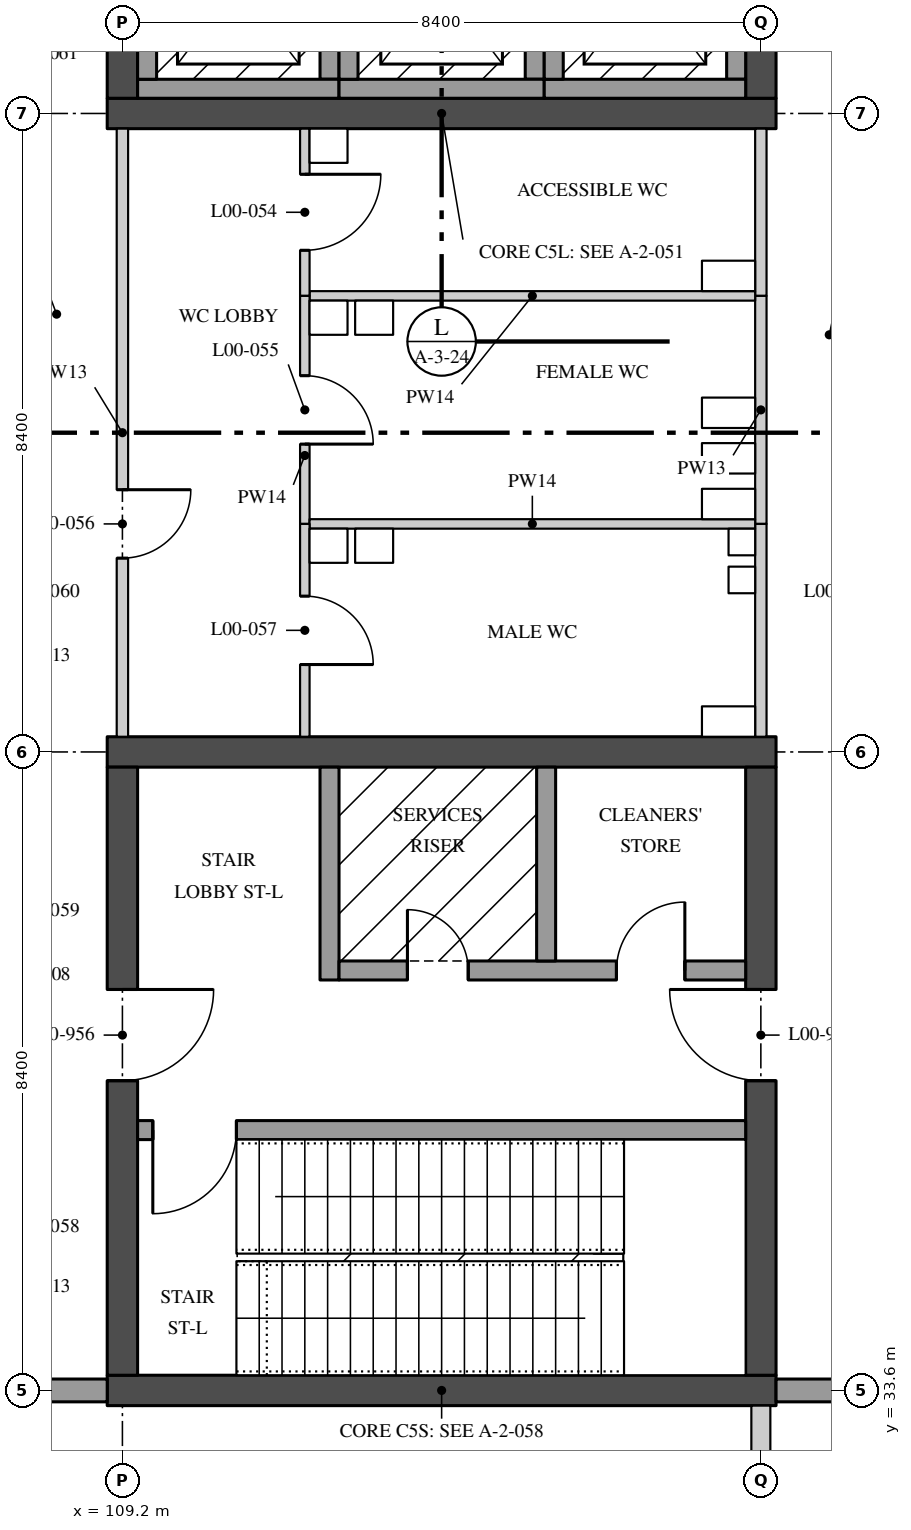
"""IFC4 building model, lengths in metres.
Left out: names, types, materials, properties, quantities, classifications, styles, units other than length and angle.
Written with IfcOpenShell. Run it as: python <this file> out.ifc"""

import sys

from ifc_helpers import new_model, si_unit, direction, frame, frame_2d, origin, place, context, subcontext, project, spatial, rectangle, extrude, element, fill, save


model = new_model("IFC4")
c1 = context("Model", 3, precision=1e-05, world=origin(), true_north=direction((0.0, 1.0)))
c2 = subcontext(c1, "Body", "Model", "MODEL_VIEW")
j1 = project(units=[si_unit("LENGTHUNIT", "METRE"), si_unit("PLANEANGLEUNIT", "RADIAN")], contexts=[c1])
p1 = place(None, origin())
s1 = spatial("IfcSite", under=j1, at=p1, CompositionType="ELEMENT")
p2 = place(p1, origin())
s2 = spatial("IfcBuilding", under=s1, at=p2, CompositionType="ELEMENT")
p3 = place(p2, origin())
s3 = spatial("IfcBuildingStorey", under=s2, at=p3, CompositionType="ELEMENT", Elevation=0.0)
p4 = place(p3, frame((109.0, 50.4, 0.0), z_axis=(0.0, 0.0, 1.0), x_axis=(1.0, 0.0, 0.0)))
e1 = element("IfcWall", 1, at=p4, inside=s3, PredefinedType="SHEAR", context=c2, shape_type="SweptSolid", body=[
    extrude(rectangle(XDim=8.8, YDim=0.4, at=frame_2d((4.4, 0.0))), origin(), (0.0, 0.0, 1.0), 5.05),
])
p5 = place(p3, frame((109.2, 50.6, 0.0), z_axis=(0.0, 0.0, 1.0), x_axis=(0.0, 1.0, 0.0)))
e2 = element("IfcWall", 2, at=p5, inside=s3, PredefinedType="SHEAR", context=c2, shape_type="SweptSolid", body=[
    extrude(rectangle(XDim=8.0, YDim=0.4, at=frame_2d((4.0, 0.0))), origin(), (0.0, 0.0, 1.0), 5.05),
])
p6 = place(p5, frame((3.25, 0.0, 0.0)))
e3 = element("IfcOpeningElement", 3, at=p6, cuts=e2, PredefinedType="OPENING", context=c2, shape_type="SweptSolid", body=[
    extrude(rectangle(XDim=1.2, YDim=2.1, at=frame_2d((0.6, 1.05))), frame((0.0, 0.21, 0.0), z_axis=(0.0, -1.0, 0.0), x_axis=(1.0, 0.0, 0.0)), (0.0, 0.0, 1.0), 0.42),
])
p7 = place(p3, frame((117.6, 50.6, 0.0), z_axis=(0.0, 0.0, 1.0), x_axis=(0.0, 1.0, 0.0)))
e4 = element("IfcWall", 4, at=p7, inside=s3, PredefinedType="SHEAR", context=c2, shape_type="SweptSolid", body=[
    extrude(rectangle(XDim=8.0, YDim=0.4, at=frame_2d((4.0, 0.0))), origin(), (0.0, 0.0, 1.0), 5.05),
])
p8 = place(p7, frame((3.25, 0.0, 0.0)))
e5 = element("IfcOpeningElement", 5, at=p8, cuts=e4, PredefinedType="OPENING", context=c2, shape_type="SweptSolid", body=[
    extrude(rectangle(XDim=1.2, YDim=2.1, at=frame_2d((0.6, 1.05))), frame((0.0, 0.21, 0.0), z_axis=(0.0, -1.0, 0.0), x_axis=(1.0, 0.0, 0.0)), (0.0, 0.0, 1.0), 0.42),
])
p9 = place(p7, frame((6.0, 0.0, 0.0)))
e6 = element("IfcOpeningElement", 6, at=p9, cuts=e4, PredefinedType="OPENING", context=c2, shape_type="SweptSolid", body=[
    extrude(rectangle(XDim=1.2, YDim=2.1, at=frame_2d((0.6, 1.05))), frame((0.0, 0.21, 0.0), z_axis=(0.0, -1.0, 0.0), x_axis=(1.0, 0.0, 0.0)), (0.0, 0.0, 1.0), 0.42),
])
for number, where, z_axis, x_axis in (
    (7, (109.0, 33.6, 0.0), (0.0, 0.0, 1.0), (1.0, 0.0, 0.0)),
    (8, (109.0, 42.0, 0.0), (0.0, 0.0, 1.0), (1.0, 0.0, 0.0)),
):
    element("IfcWall", number, at=place(p3, frame(where, z_axis=z_axis, x_axis=x_axis)), inside=s3, PredefinedType="SHEAR", context=c2, shape_type="SweptSolid", body=[
        extrude(rectangle(XDim=8.8, YDim=0.4, at=frame_2d((4.4, 0.0))), origin(), (0.0, 0.0, 1.0), 5.05),
    ])
p10 = place(p3, frame((109.2, 33.8, 0.0), z_axis=(0.0, 0.0, 1.0), x_axis=(0.0, 1.0, 0.0)))
e9 = element("IfcWall", 9, at=p10, inside=s3, PredefinedType="SHEAR", context=c2, shape_type="SweptSolid", body=[
    extrude(rectangle(XDim=8.0, YDim=0.4, at=frame_2d((4.0, 0.0))), origin(), (0.0, 0.0, 1.0), 5.05),
])
p11 = place(p10, frame((3.875, 0.0, 0.0)))
e10 = element("IfcOpeningElement", 10, at=p11, cuts=e9, PredefinedType="OPENING", context=c2, shape_type="SweptSolid", body=[
    extrude(rectangle(XDim=1.2, YDim=2.1, at=frame_2d((0.6, 1.05))), frame((0.0, 0.21, 0.0), z_axis=(0.0, -1.0, 0.0), x_axis=(1.0, 0.0, 0.0)), (0.0, 0.0, 1.0), 0.42),
])
p12 = place(p3, frame((117.6, 33.8, 0.0), z_axis=(0.0, 0.0, 1.0), x_axis=(0.0, 1.0, 0.0)))
e11 = element("IfcWall", 11, at=p12, inside=s3, PredefinedType="SHEAR", context=c2, shape_type="SweptSolid", body=[
    extrude(rectangle(XDim=8.0, YDim=0.4, at=frame_2d((4.0, 0.0))), origin(), (0.0, 0.0, 1.0), 5.05),
])
p13 = place(p12, frame((3.875, 0.0, 0.0)))
e12 = element("IfcOpeningElement", 12, at=p13, cuts=e11, PredefinedType="OPENING", context=c2, shape_type="SweptSolid", body=[
    extrude(rectangle(XDim=1.2, YDim=2.1, at=frame_2d((0.6, 1.05))), frame((0.0, 0.21, 0.0), z_axis=(0.0, -1.0, 0.0), x_axis=(1.0, 0.0, 0.0)), (0.0, 0.0, 1.0), 0.42),
])
p14 = place(p3, frame((109.4, 37.025, 0.0), z_axis=(0.0, 0.0, 1.0), x_axis=(1.0, 0.0, 0.0)))
e13 = element("IfcWall", 13, at=p14, inside=s3, PredefinedType="SOLIDWALL", context=c2, shape_type="SweptSolid", body=[
    extrude(rectangle(XDim=8.0, YDim=0.25, at=frame_2d((4.0, 0.0))), origin(), (0.0, 0.0, 1.0), 5.05),
])
p15 = place(p14, frame((0.2, 0.0, 0.0)))
e14 = element("IfcOpeningElement", 14, at=p15, cuts=e13, PredefinedType="OPENING", context=c2, shape_type="SweptSolid", body=[
    extrude(rectangle(XDim=1.1, YDim=2.1, at=frame_2d((0.55, 1.05))), frame((0.0, 0.135, 0.0), z_axis=(0.0, -1.0, 0.0), x_axis=(1.0, 0.0, 0.0)), (0.0, 0.0, 1.0), 0.27),
])
p16 = place(p3, frame((111.925, 39.0, 0.0), z_axis=(0.0, 0.0, 1.0), x_axis=(0.0, 1.0, 0.0)))
e15 = element("IfcWall", 15, at=p16, inside=s3, PredefinedType="SOLIDWALL", context=c2, shape_type="SweptSolid", body=[
    extrude(rectangle(XDim=2.8, YDim=0.25, at=frame_2d((1.4, 0.0))), origin(), (0.0, 0.0, 1.0), 5.05),
])
p17 = place(p3, frame((112.05, 39.125, 0.0), z_axis=(0.0, 0.0, 1.0), x_axis=(1.0, 0.0, 0.0)))
e16 = element("IfcWall", 16, at=p17, inside=s3, PredefinedType="SOLIDWALL", context=c2, shape_type="SweptSolid", body=[
    extrude(rectangle(XDim=5.35, YDim=0.25, at=frame_2d((2.675, 0.0))), origin(), (0.0, 0.0, 1.0), 5.05),
])
p18 = place(p17, frame((3.65, 0.0, 0.0)))
e17 = element("IfcOpeningElement", 17, at=p18, cuts=e16, PredefinedType="OPENING", context=c2, shape_type="SweptSolid", body=[
    extrude(rectangle(XDim=0.9, YDim=2.1, at=frame_2d((0.45, 1.05))), frame((0.0, 0.135, 0.0), z_axis=(0.0, -1.0, 0.0), x_axis=(1.0, 0.0, 0.0)), (0.0, 0.0, 1.0), 0.27),
])
p19 = place(p17, frame((0.9, 0.0, 0.0)))
e18 = element("IfcOpeningElement", 18, at=p19, cuts=e16, PredefinedType="OPENING", context=c2, shape_type="SweptSolid", body=[
    extrude(rectangle(XDim=0.8, YDim=2.1, at=frame_2d((0.4, 1.05))), frame((0.0, 0.135, 0.0), z_axis=(0.0, -1.0, 0.0), x_axis=(1.0, 0.0, 0.0)), (0.0, 0.0, 1.0), 0.27),
])
p20 = place(p3, frame((114.775, 39.25, 0.0), z_axis=(0.0, 0.0, 1.0), x_axis=(0.0, 1.0, 0.0)))
e19 = element("IfcWall", 19, at=p20, inside=s3, PredefinedType="SOLIDWALL", context=c2, shape_type="SweptSolid", body=[
    extrude(rectangle(XDim=2.55, YDim=0.25, at=frame_2d((1.275, 0.0))), origin(), (0.0, 0.0, 1.0), 5.05),
])
p21 = place(p3, frame((111.925, 50.85, 0.0), z_axis=(0.0, 0.0, 1.0), x_axis=(0.0, 1.0, 0.0)))
e20 = element("IfcWall", 20, at=p21, inside=s3, PredefinedType="SOLIDWALL", context=c2, shape_type="SweptSolid", body=[
    extrude(rectangle(XDim=2.3, YDim=0.25, at=frame_2d((1.15, 0.0))), origin(), (0.0, 0.0, 1.0), 5.05),
])
p22 = place(p3, frame((109.4, 50.725, 0.0), z_axis=(0.0, 0.0, 1.0), x_axis=(1.0, 0.0, 0.0)))
e21 = element("IfcWall", 21, at=p22, inside=s3, PredefinedType="SOLIDWALL", context=c2, shape_type="SweptSolid", body=[
    extrude(rectangle(XDim=2.65, YDim=0.25, at=frame_2d((1.325, 0.0))), origin(), (0.0, 0.0, 1.0), 5.05),
])
for number, where, z_axis, x_axis in (
    (22, (109.525, 50.85, 0.0), (0.0, 0.0, 1.0), (0.0, 1.0, 0.0)),
    (23, (114.625, 50.85, 0.0), (0.0, 0.0, 1.0), (0.0, 1.0, 0.0)),
):
    element("IfcWall", number, at=place(p3, frame(where, z_axis=z_axis, x_axis=x_axis)), inside=s3, PredefinedType="SOLIDWALL", context=c2, shape_type="SweptSolid", body=[
        extrude(rectangle(XDim=2.3, YDim=0.25, at=frame_2d((1.15, 0.0))), origin(), (0.0, 0.0, 1.0), 5.05),
    ])
p23 = place(p3, frame((112.05, 50.725, 0.0), z_axis=(0.0, 0.0, 1.0), x_axis=(1.0, 0.0, 0.0)))
e24 = element("IfcWall", 24, at=p23, inside=s3, PredefinedType="SOLIDWALL", context=c2, shape_type="SweptSolid", body=[
    extrude(rectangle(XDim=2.7, YDim=0.25, at=frame_2d((1.35, 0.0))), origin(), (0.0, 0.0, 1.0), 5.05),
])
for number, where, z_axis, x_axis in (
    (25, (112.175, 50.85, 0.0), (0.0, 0.0, 1.0), (0.0, 1.0, 0.0)),
    (26, (117.275, 50.85, 0.0), (0.0, 0.0, 1.0), (0.0, 1.0, 0.0)),
):
    element("IfcWall", number, at=place(p3, frame(where, z_axis=z_axis, x_axis=x_axis)), inside=s3, PredefinedType="SOLIDWALL", context=c2, shape_type="SweptSolid", body=[
        extrude(rectangle(XDim=2.3, YDim=0.25, at=frame_2d((1.15, 0.0))), origin(), (0.0, 0.0, 1.0), 5.05),
    ])
p24 = place(p3, frame((114.75, 50.725, 0.0), z_axis=(0.0, 0.0, 1.0), x_axis=(1.0, 0.0, 0.0)))
e27 = element("IfcWall", 27, at=p24, inside=s3, PredefinedType="SOLIDWALL", context=c2, shape_type="SweptSolid", body=[
    extrude(rectangle(XDim=2.65, YDim=0.25, at=frame_2d((1.325, 0.0))), origin(), (0.0, 0.0, 1.0), 5.05),
])
p25 = place(p3, frame((114.875, 50.85, 0.0), z_axis=(0.0, 0.0, 1.0), x_axis=(0.0, 1.0, 0.0)))
e28 = element("IfcWall", 28, at=p25, inside=s3, PredefinedType="SOLIDWALL", context=c2, shape_type="SweptSolid", body=[
    extrude(rectangle(XDim=2.3, YDim=0.25, at=frame_2d((1.15, 0.0))), origin(), (0.0, 0.0, 1.0), 5.05),
])
p26 = place(p3, frame((117.6, 25.65, 0.0), z_axis=(0.0, 0.0, 1.0), x_axis=(0.0, 1.0, 0.0)))
e29 = element("IfcWall", 29, at=p26, inside=s3, PredefinedType="PARTITIONING", context=c2, shape_type="SweptSolid", body=[
    extrude(rectangle(XDim=7.75, YDim=0.25, at=frame_2d((3.875, 0.0))), origin(), (0.0, 0.0, 1.0), 8.375),
])
p27 = place(p3, frame((117.6, 48.0, 0.0), z_axis=(0.0, 0.0, 1.0), x_axis=(0.0, 1.0, 0.0)))
e30 = element("IfcWall", 30, at=p27, inside=s3, PredefinedType="PARTITIONING", context=c2, shape_type="SweptSolid", body=[
    extrude(rectangle(XDim=2.2, YDim=0.15, at=frame_2d((1.1, 0.0))), origin(), (0.0, 0.0, 1.0), 5.05),
])
p28 = place(p3, frame((117.6, 45.0, 0.0), z_axis=(0.0, 0.0, 1.0), x_axis=(0.0, 1.0, 0.0)))
e31 = element("IfcWall", 31, at=p28, inside=s3, PredefinedType="PARTITIONING", context=c2, shape_type="SweptSolid", body=[
    extrude(rectangle(XDim=3.0, YDim=0.15, at=frame_2d((1.5, 0.0))), origin(), (0.0, 0.0, 1.0), 5.05),
])
p29 = place(p3, frame((117.6, 42.2, 0.0), z_axis=(0.0, 0.0, 1.0), x_axis=(0.0, 1.0, 0.0)))
e32 = element("IfcWall", 32, at=p29, inside=s3, PredefinedType="PARTITIONING", context=c2, shape_type="SweptSolid", body=[
    extrude(rectangle(XDim=2.8, YDim=0.15, at=frame_2d((1.4, 0.0))), origin(), (0.0, 0.0, 1.0), 5.05),
])
p30 = place(p3, frame((109.2, 42.2, 0.0), z_axis=(0.0, 0.0, 1.0), x_axis=(0.0, 1.0, 0.0)))
e33 = element("IfcWall", 33, at=p30, inside=s3, PredefinedType="PARTITIONING", context=c2, shape_type="SweptSolid", body=[
    extrude(rectangle(XDim=8.0, YDim=0.15, at=frame_2d((4.0, 0.0))), origin(), (0.0, 0.0, 1.0), 5.05),
])
p31 = place(p30, frame((2.35, 0.0, 0.0)))
e34 = element("IfcOpeningElement", 34, at=p31, cuts=e33, PredefinedType="OPENING", context=c2, shape_type="SweptSolid", body=[
    extrude(rectangle(XDim=0.9, YDim=2.1, at=frame_2d((0.45, 1.05))), frame((0.0, 0.085, 0.0), z_axis=(0.0, -1.0, 0.0), x_axis=(1.0, 0.0, 0.0)), (0.0, 0.0, 1.0), 0.17),
])
p32 = place(p3, frame((111.662, 48.0, 0.0), z_axis=(0.0, 0.0, 1.0), x_axis=(1.0, 0.0, 0.0)))
e35 = element("IfcWall", 35, at=p32, inside=s3, PredefinedType="PARTITIONING", context=c2, shape_type="SweptSolid", body=[
    extrude(rectangle(XDim=5.863, YDim=0.125, at=frame_2d((2.931, 0.0))), origin(), (0.0, 0.0, 1.0), 5.05),
])
p33 = place(p3, frame((111.6, 48.0, 0.0), z_axis=(0.0, 0.0, 1.0), x_axis=(0.0, 1.0, 0.0)))
e36 = element("IfcWall", 36, at=p33, inside=s3, PredefinedType="PARTITIONING", context=c2, shape_type="SweptSolid", body=[
    extrude(rectangle(XDim=2.2, YDim=0.125, at=frame_2d((1.1, 0.0))), origin(), (0.0, 0.0, 1.0), 5.05),
])
p34 = place(p33, frame((0.6, 0.0, 0.0)))
e37 = element("IfcOpeningElement", 37, at=p34, cuts=e36, PredefinedType="OPENING", context=c2, shape_type="SweptSolid", body=[
    extrude(rectangle(XDim=1.0, YDim=2.1, at=frame_2d((0.5, 1.05))), frame((0.0, 0.073, 0.0), z_axis=(0.0, -1.0, 0.0), x_axis=(1.0, 0.0, 0.0)), (0.0, 0.0, 1.0), 0.145),
])
p35 = place(p3, frame((111.6, 45.0, 0.0), z_axis=(0.0, 0.0, 1.0), x_axis=(0.0, 1.0, 0.0)))
e38 = element("IfcWall", 38, at=p35, inside=s3, PredefinedType="PARTITIONING", context=c2, shape_type="SweptSolid", body=[
    extrude(rectangle(XDim=3.0, YDim=0.125, at=frame_2d((1.5, 0.0))), origin(), (0.0, 0.0, 1.0), 5.05),
])
p36 = place(p35, frame((1.05, 0.0, 0.0)))
e39 = element("IfcOpeningElement", 39, at=p36, cuts=e38, PredefinedType="OPENING", context=c2, shape_type="SweptSolid", body=[
    extrude(rectangle(XDim=0.9, YDim=2.1, at=frame_2d((0.45, 1.05))), frame((0.0, 0.073, 0.0), z_axis=(0.0, -1.0, 0.0), x_axis=(1.0, 0.0, 0.0)), (0.0, 0.0, 1.0), 0.145),
])
p37 = place(p3, frame((111.662, 45.0, 0.0), z_axis=(0.0, 0.0, 1.0), x_axis=(1.0, 0.0, 0.0)))
e40 = element("IfcWall", 40, at=p37, inside=s3, PredefinedType="PARTITIONING", context=c2, shape_type="SweptSolid", body=[
    extrude(rectangle(XDim=5.863, YDim=0.125, at=frame_2d((2.931, 0.0))), origin(), (0.0, 0.0, 1.0), 5.05),
])
p38 = place(p3, frame((111.6, 42.2, 0.0), z_axis=(0.0, 0.0, 1.0), x_axis=(0.0, 1.0, 0.0)))
e41 = element("IfcWall", 41, at=p38, inside=s3, PredefinedType="PARTITIONING", context=c2, shape_type="SweptSolid", body=[
    extrude(rectangle(XDim=2.8, YDim=0.125, at=frame_2d((1.4, 0.0))), origin(), (0.0, 0.0, 1.0), 5.05),
])
p39 = place(p38, frame((0.95, 0.0, 0.0)))
e42 = element("IfcOpeningElement", 42, at=p39, cuts=e41, PredefinedType="OPENING", context=c2, shape_type="SweptSolid", body=[
    extrude(rectangle(XDim=0.9, YDim=2.1, at=frame_2d((0.45, 1.05))), frame((0.0, 0.073, 0.0), z_axis=(0.0, -1.0, 0.0), x_axis=(1.0, 0.0, 0.0)), (0.0, 0.0, 1.0), 0.145),
])
p40 = place(p3, frame((125.55, 33.6, 0.0), z_axis=(0.0, 0.0, 1.0), x_axis=(-1.0, 0.0, 0.0)))
e43 = element("IfcWall", 43, at=p40, inside=s3, PredefinedType="SOLIDWALL", context=c2, shape_type="SweptSolid", body=[
    extrude(rectangle(XDim=7.75, YDim=0.3, at=frame_2d((3.875, 0.0))), origin(), (0.0, 0.0, 1.0), 5.4),
])
p41 = place(p3, frame((109.0, 33.6, 0.0), z_axis=(0.0, 0.0, 1.0), x_axis=(-1.0, 0.0, 0.0)))
e44 = element("IfcWall", 44, at=p41, inside=s3, PredefinedType="SOLIDWALL", context=c2, shape_type="SweptSolid", body=[
    extrude(rectangle(XDim=8.0, YDim=0.3, at=frame_2d((4.0, 0.0))), origin(), (0.0, 0.0, 1.0), 5.05),
])
p42 = place(p18, origin())
e45 = element("IfcDoor", 45, at=p42, inside=s3, OperationType="SINGLE_SWING_LEFT", PredefinedType="DOOR", context=c2, shape_type="SweptSolid", body=[
    extrude(rectangle(XDim=0.9, YDim=2.1, at=frame_2d((0.45, 1.05))), frame((0.0, 0.035, 0.0), z_axis=(0.0, -1.0, 0.0), x_axis=(1.0, 0.0, 0.0)), (0.0, 0.0, 1.0), 0.07),
])
fill(e17, e45)
p43 = place(p11, frame((1.2, 0.0, 0.0), z_axis=(0.0, 0.0, 1.0), x_axis=(-1.0, 0.0, 0.0)))
e46 = element("IfcDoor", 46, at=p43, inside=s3, OperationType="SINGLE_SWING_RIGHT", PredefinedType="DOOR", context=c2, shape_type="SweptSolid", body=[
    extrude(rectangle(XDim=1.2, YDim=2.1, at=frame_2d((0.6, 1.05))), frame((0.0, 0.035, 0.0), z_axis=(0.0, -1.0, 0.0), x_axis=(1.0, 0.0, 0.0)), (0.0, 0.0, 1.0), 0.07),
])
fill(e10, e46)
p44 = place(p13, origin())
e47 = element("IfcDoor", 47, at=p44, inside=s3, OperationType="SINGLE_SWING_LEFT", PredefinedType="DOOR", context=c2, shape_type="SweptSolid", body=[
    extrude(rectangle(XDim=1.2, YDim=2.1, at=frame_2d((0.6, 1.05))), frame((0.0, 0.035, 0.0), z_axis=(0.0, -1.0, 0.0), x_axis=(1.0, 0.0, 0.0)), (0.0, 0.0, 1.0), 0.07),
])
fill(e12, e47)
p45 = place(p19, origin())
e48 = element("IfcDoor", 48, at=p45, inside=s3, OperationType="SINGLE_SWING_RIGHT", PredefinedType="DOOR", context=c2, shape_type="SweptSolid", body=[
    extrude(rectangle(XDim=0.8, YDim=2.1, at=frame_2d((0.4, 1.05))), frame((0.0, 0.035, 0.0), z_axis=(0.0, -1.0, 0.0), x_axis=(1.0, 0.0, 0.0)), (0.0, 0.0, 1.0), 0.07),
])
fill(e18, e48)
p46 = place(p15, frame((1.1, 0.0, 0.0), z_axis=(0.0, 0.0, 1.0), x_axis=(-1.0, 0.0, 0.0)))
e49 = element("IfcDoor", 49, at=p46, inside=s3, OperationType="SINGLE_SWING_LEFT", PredefinedType="DOOR", context=c2, shape_type="SweptSolid", body=[
    extrude(rectangle(XDim=1.1, YDim=2.1, at=frame_2d((0.55, 1.05))), frame((0.0, 0.035, 0.0), z_axis=(0.0, -1.0, 0.0), x_axis=(1.0, 0.0, 0.0)), (0.0, 0.0, 1.0), 0.07),
])
fill(e14, e49)
p47 = place(p34, frame((1.0, 0.0, 0.0), z_axis=(0.0, 0.0, 1.0), x_axis=(-1.0, 0.0, 0.0)))
e50 = element("IfcDoor", 50, at=p47, inside=s3, OperationType="SINGLE_SWING_RIGHT", PredefinedType="DOOR", context=c2, shape_type="SweptSolid", body=[
    extrude(rectangle(XDim=1.0, YDim=2.1, at=frame_2d((0.5, 1.05))), frame((0.0, 0.02, 0.0), z_axis=(0.0, -1.0, 0.0), x_axis=(1.0, 0.0, 0.0)), (0.0, 0.0, 1.0), 0.04),
])
fill(e37, e50)
p48 = place(p36, frame((0.9, 0.0, 0.0), z_axis=(0.0, 0.0, 1.0), x_axis=(-1.0, 0.0, 0.0)))
e51 = element("IfcDoor", 51, at=p48, inside=s3, OperationType="SINGLE_SWING_LEFT", PredefinedType="DOOR", context=c2, shape_type="SweptSolid", body=[
    extrude(rectangle(XDim=0.9, YDim=2.1, at=frame_2d((0.45, 1.05))), frame((0.0, 0.02, 0.0), z_axis=(0.0, -1.0, 0.0), x_axis=(1.0, 0.0, 0.0)), (0.0, 0.0, 1.0), 0.04),
])
fill(e39, e51)
p49 = place(p31, frame((0.9, 0.0, 0.0), z_axis=(0.0, 0.0, 1.0), x_axis=(-1.0, 0.0, 0.0)))
e52 = element("IfcDoor", 52, at=p49, inside=s3, OperationType="SINGLE_SWING_RIGHT", PredefinedType="DOOR", context=c2, shape_type="SweptSolid", body=[
    extrude(rectangle(XDim=0.9, YDim=2.1, at=frame_2d((0.45, 1.05))), frame((0.0, 0.025, 0.0), z_axis=(0.0, -1.0, 0.0), x_axis=(1.0, 0.0, 0.0)), (0.0, 0.0, 1.0), 0.05),
])
fill(e34, e52)
p50 = place(p39, frame((0.9, 0.0, 0.0), z_axis=(0.0, 0.0, 1.0), x_axis=(-1.0, 0.0, 0.0)))
e53 = element("IfcDoor", 53, at=p50, inside=s3, OperationType="SINGLE_SWING_LEFT", PredefinedType="DOOR", context=c2, shape_type="SweptSolid", body=[
    extrude(rectangle(XDim=0.9, YDim=2.1, at=frame_2d((0.45, 1.05))), frame((0.0, 0.02, 0.0), z_axis=(0.0, -1.0, 0.0), x_axis=(1.0, 0.0, 0.0)), (0.0, 0.0, 1.0), 0.04),
])
fill(e42, e53)
save(model, sys.argv[1])
